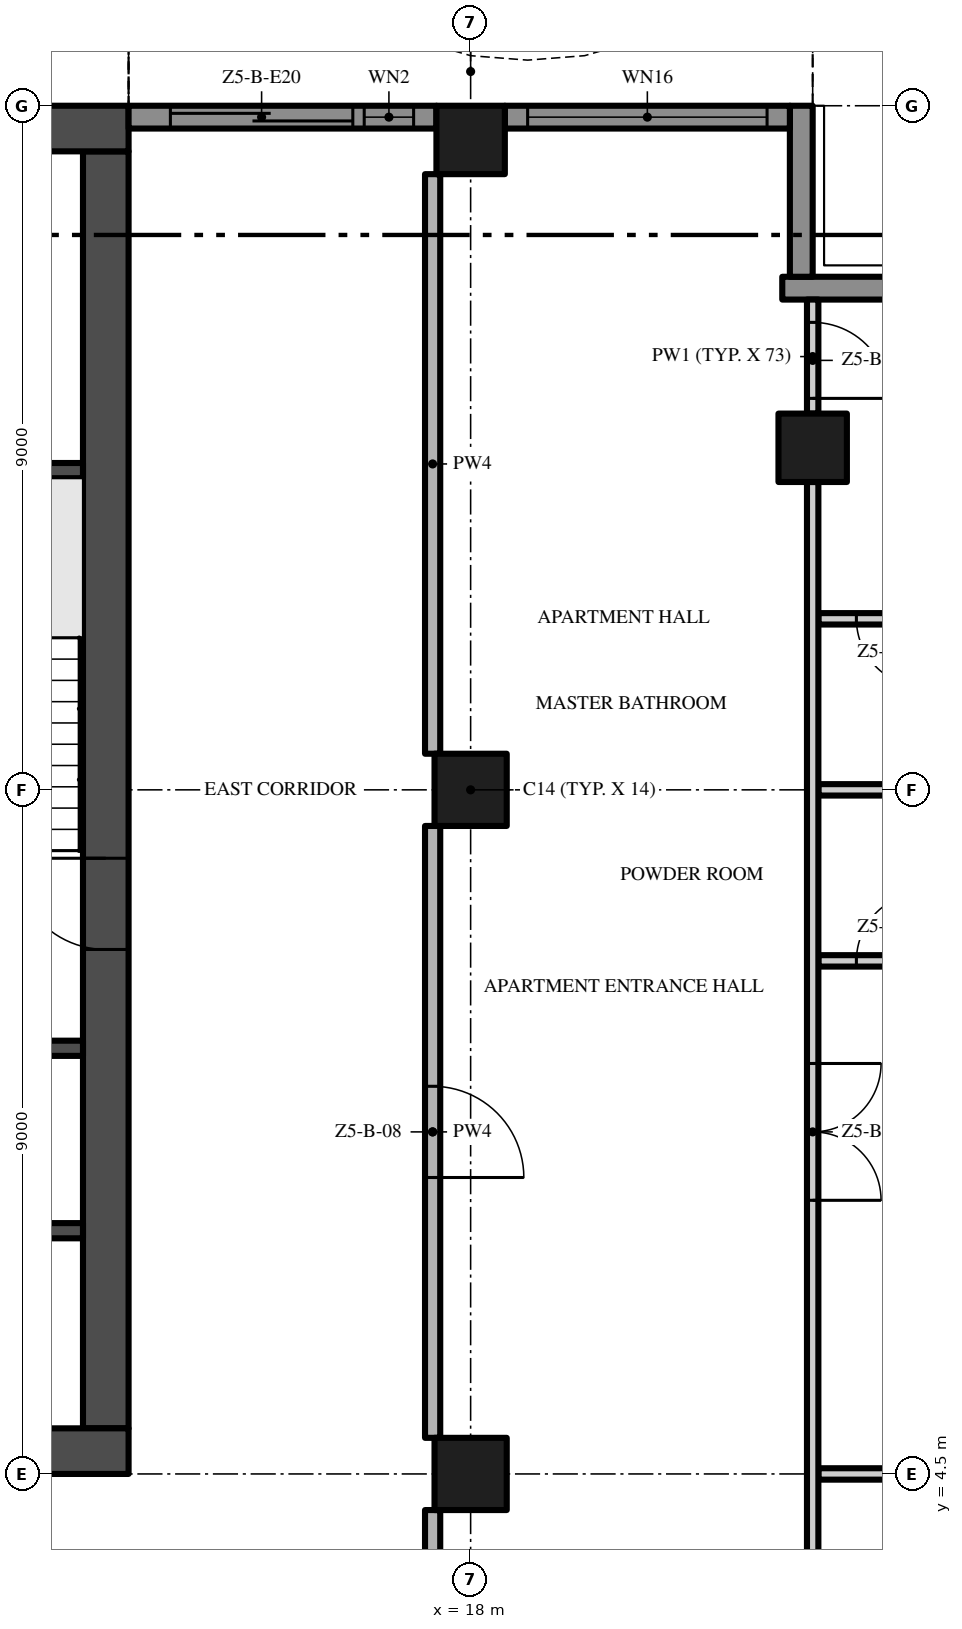
"""IFC4 building model, lengths in metres.
Left out: names, types, materials, properties, quantities, classifications, styles, units other than length and angle.
Written with IfcOpenShell. Run it as: python <this file> out.ifc"""

import sys

from ifc_helpers import new_model, si_unit, direction, frame, frame_2d, origin, origin_2d, place, context, subcontext, project, spatial, polyline, rectangle, outline, extrude, element, fill, save


model = new_model("IFC4")
c1 = context("Model", 3, precision=1e-05, world=origin(), true_north=direction((0.0, 1.0)))
c2 = subcontext(c1, "Body", "Model", "MODEL_VIEW")
j1 = project(units=[si_unit("LENGTHUNIT", "METRE"), si_unit("PLANEANGLEUNIT", "RADIAN")], contexts=[c1])
p1 = place(None, origin())
s1 = spatial("IfcSite", under=j1, at=p1, CompositionType="ELEMENT")
p2 = place(p1, origin())
s2 = spatial("IfcBuilding", under=s1, at=p2, CompositionType="ELEMENT")
p3 = place(p2, frame((0.0, 0.0, 257.8)))
s3 = spatial("IfcBuildingStorey", under=s2, at=p3, CompositionType="ELEMENT", Elevation=257.8)
p4 = place(p3, frame((-13.5, 4.8, -0.3), z_axis=(0.0, 0.0, 1.0), x_axis=(1.0, 0.0, 0.0)))
e1 = element("IfcWall", 1, at=p4, inside=s3, PredefinedType="SHEAR", context=c2, shape_type="SweptSolid", body=[
    extrude(rectangle(XDim=27.0, YDim=0.6, at=frame_2d((13.5, 0.0))), origin(), (0.0, 0.0, 1.0), 3.8),
])
p5 = place(p4, frame((12.0, 0.0, 0.3)))
e2 = element("IfcOpeningElement", 2, at=p5, cuts=e1, PredefinedType="OPENING", context=c2, shape_type="SweptSolid", body=[
    extrude(rectangle(XDim=3.0, YDim=2.4, at=frame_2d((1.5, 1.2))), frame((0.0, 0.31, 0.0), z_axis=(0.0, -1.0, 0.0), x_axis=(1.0, 0.0, 0.0)), (0.0, 0.0, 1.0), 0.62),
])
p6 = place(p4, frame((4.9, 0.0, 0.3)))
e3 = element("IfcOpeningElement", 3, at=p6, cuts=e1, PredefinedType="OPENING", context=c2, shape_type="SweptSolid", body=[
    extrude(rectangle(XDim=1.2, YDim=2.2, at=frame_2d((0.6, 1.1))), frame((0.0, 0.31, 0.0), z_axis=(0.0, -1.0, 0.0), x_axis=(1.0, 0.0, 0.0)), (0.0, 0.0, 1.0), 0.62),
])
p7 = place(p4, frame((20.75, 0.0, 0.3)))
e4 = element("IfcOpeningElement", 4, at=p7, cuts=e1, PredefinedType="OPENING", context=c2, shape_type="SweptSolid", body=[
    extrude(rectangle(XDim=1.5, YDim=2.2, at=frame_2d((0.75, 1.1))), frame((0.0, 0.31, 0.0), z_axis=(0.0, -1.0, 0.0), x_axis=(1.0, 0.0, 0.0)), (0.0, 0.0, 1.0), 0.62),
])
p8 = place(p4, frame((17.4, 0.0, 0.3)))
e5 = element("IfcOpeningElement", 5, at=p8, cuts=e1, PredefinedType="OPENING", context=c2, shape_type="SweptSolid", body=[
    extrude(rectangle(XDim=1.2, YDim=2.2, at=frame_2d((0.6, 1.1))), frame((0.0, 0.31, 0.0), z_axis=(0.0, -1.0, 0.0), x_axis=(1.0, 0.0, 0.0)), (0.0, 0.0, 1.0), 0.62),
])
p9 = place(p3, frame((13.2, 5.1, -0.3), z_axis=(0.0, 0.0, 1.0), x_axis=(0.0, 1.0, 0.0)))
e6 = element("IfcWall", 6, at=p9, inside=s3, PredefinedType="SHEAR", context=c2, shape_type="SweptSolid", body=[
    extrude(rectangle(XDim=16.8, YDim=0.6, at=frame_2d((8.4, 0.0))), origin(), (0.0, 0.0, 1.0), 3.8),
])
p10 = place(p9, frame((6.3, 0.0, 0.3)))
e7 = element("IfcOpeningElement", 7, at=p10, cuts=e6, PredefinedType="OPENING", context=c2, shape_type="SweptSolid", body=[
    extrude(rectangle(XDim=1.2, YDim=2.2, at=frame_2d((0.6, 1.1))), frame((0.0, 0.31, 0.0), z_axis=(0.0, -1.0, 0.0), x_axis=(1.0, 0.0, 0.0)), (0.0, 0.0, 1.0), 0.62),
])
p11 = place(p3, frame((13.5, 22.2, -0.3), z_axis=(0.0, 0.0, 1.0), x_axis=(-1.0, 0.0, 0.0)))
e8 = element("IfcWall", 8, at=p11, inside=s3, PredefinedType="SHEAR", context=c2, shape_type="SweptSolid", body=[
    extrude(rectangle(XDim=27.0, YDim=0.6, at=frame_2d((13.5, 0.0))), origin(), (0.0, 0.0, 1.0), 3.8),
])
p12 = place(p3, frame((18.0, 13.5, 0.0), z_axis=(0.0, 0.0, 1.0), x_axis=(1.0, 0.0, 0.0)))
e9 = element("IfcColumn", 9, at=p12, inside=s3, PredefinedType="COLUMN", context=c2, shape_type="SweptSolid", body=[
    extrude(rectangle(XDim=0.95, YDim=0.95, at=origin_2d()), origin(), (0.0, 0.0, 1.0), 3.5),
])
p13 = place(p3, frame((18.0, 22.05, 0.0), z_axis=(0.0, 0.0, 1.0), x_axis=(1.0, 0.0, 0.0)))
e10 = element("IfcColumn", 10, at=p13, inside=s3, PredefinedType="COLUMN", context=c2, shape_type="SweptSolid", body=[
    extrude(rectangle(XDim=0.9, YDim=0.9, at=origin_2d()), origin(), (0.0, 0.0, 1.0), 3.5),
])
p14 = place(p3, frame((18.0, 4.5, 0.0), z_axis=(0.0, 0.0, 1.0), x_axis=(1.0, 0.0, 0.0)))
e11 = element("IfcColumn", 11, at=p14, inside=s3, PredefinedType="COLUMN", context=c2, shape_type="SweptSolid", body=[
    extrude(rectangle(XDim=0.95, YDim=0.95, at=origin_2d()), origin(), (0.0, 0.0, 1.0), 3.5),
])
p15 = place(p3, frame((22.5, 18.0, 0.0), z_axis=(0.0, 0.0, 1.0), x_axis=(1.0, 0.0, 0.0)))
e12 = element("IfcColumn", 12, at=p15, inside=s3, PredefinedType="COLUMN", context=c2, shape_type="SweptSolid", body=[
    extrude(rectangle(XDim=0.9, YDim=0.9, at=origin_2d()), origin(), (0.0, 0.0, 1.0), 3.5),
])
p16 = place(p3, frame((22.1, 20.1, 0.0), z_axis=(0.0, 0.0, 1.0), x_axis=(1.0, 0.0, 0.0)))
e13 = element("IfcWall", 13, at=p16, inside=s3, PredefinedType="SOLIDWALL", context=c2, shape_type="SweptSolid", body=[
    extrude(rectangle(XDim=2.35, YDim=0.3, at=frame_2d((1.175, 0.0))), origin(), (0.0, 0.0, 1.0), 3.5),
])
p17 = place(p3, frame((22.35, 22.5, 0.0), z_axis=(0.0, 0.0, 1.0), x_axis=(0.0, -1.0, 0.0)))
e14 = element("IfcWall", 14, at=p17, inside=s3, PredefinedType="SOLIDWALL", context=c2, shape_type="SweptSolid", body=[
    extrude(rectangle(XDim=2.25, YDim=0.3, at=frame_2d((1.125, 0.0))), origin(), (0.0, 0.0, 1.0), 3.5),
])
p18 = place(p3, frame((18.45, 22.35, 0.0), z_axis=(0.0, 0.0, 1.0), x_axis=(1.0, 0.0, 0.0)))
e15 = element("IfcWall", 15, at=p18, inside=s3, PredefinedType="SOLIDWALL", context=c2, shape_type="SweptSolid", body=[
    extrude(rectangle(XDim=3.75, YDim=0.3, at=frame_2d((1.875, 0.0))), origin(), (0.0, 0.0, 1.0), 3.5),
])
p19 = place(p18, frame((0.3, 0.0, 0.45)))
e16 = element("IfcOpeningElement", 16, at=p19, cuts=e15, PredefinedType="OPENING", context=c2, shape_type="SweptSolid", body=[
    extrude(rectangle(XDim=3.15, YDim=2.65, at=frame_2d((1.575, 1.325))), frame((0.0, 0.16, 0.0), z_axis=(0.0, -1.0, 0.0), x_axis=(1.0, 0.0, 0.0)), (0.0, 0.0, 1.0), 0.32),
])
p20 = place(p3, frame((13.5, 22.35, 0.0), z_axis=(0.0, 0.0, 1.0), x_axis=(1.0, 0.0, 0.0)))
e17 = element("IfcWall", 17, at=p20, inside=s3, PredefinedType="SOLIDWALL", context=c2, shape_type="SweptSolid", body=[
    extrude(rectangle(XDim=4.05, YDim=0.3, at=frame_2d((2.025, 0.0))), origin(), (0.0, 0.0, 1.0), 3.5),
])
p21 = place(p20, frame((3.1, 0.0, 0.45)))
e18 = element("IfcOpeningElement", 18, at=p21, cuts=e17, PredefinedType="OPENING", context=c2, shape_type="SweptSolid", body=[
    extrude(rectangle(XDim=0.65, YDim=2.65, at=frame_2d((0.325, 1.325))), frame((0.0, 0.16, 0.0), z_axis=(0.0, -1.0, 0.0), x_axis=(1.0, 0.0, 0.0)), (0.0, 0.0, 1.0), 0.32),
])
p22 = place(p20, frame((0.55, 0.0, 0.0)))
e19 = element("IfcOpeningElement", 19, at=p22, cuts=e17, PredefinedType="OPENING", context=c2, shape_type="SweptSolid", body=[
    extrude(rectangle(XDim=2.4, YDim=2.4, at=frame_2d((1.2, 1.2))), frame((0.0, 0.16, 0.0), z_axis=(0.0, -1.0, 0.0), x_axis=(1.0, 0.0, 0.0)), (0.0, 0.0, 1.0), 0.32),
])
p23 = place(p3, origin())
e20 = element("IfcWall", 20, at=p23, inside=s3, PredefinedType="USERDEFINED", context=c2, shape_type="SweptSolid", body=[
    extrude(outline(polyline([(22.5, 24.3), (21.0, 23.595), (19.5, 23.159), (18.75, 23.1), (18.0, 23.159), (16.5, 23.595), (15.0, 24.3), (13.5, 25.005), (13.394, 24.779), (14.894, 24.074), (16.411, 23.36), (17.955, 22.911), (18.75, 22.849), (19.545, 22.911), (21.089, 23.36), (22.606, 24.074), (22.5, 24.3)])), origin(), (0.0, 0.0, 1.0), 0.9),
])
for number, where, z_axis, x_axis in (
    (21, (9.65, 7.7, 0.0), (0.0, 0.0, 1.0), (1.0, 0.0, 0.0)),
    (22, (9.65, 10.1, 0.0), (0.0, 0.0, 1.0), (1.0, 0.0, 0.0)),
    (23, (9.65, 17.7, 0.0), (0.0, 0.0, 1.0), (1.0, 0.0, 0.0)),
):
    element("IfcWall", number, at=place(p3, frame(where, z_axis=z_axis, x_axis=x_axis)), inside=s3, PredefinedType="SHEAR", context=c2, shape_type="SweptSolid", body=[
        extrude(rectangle(XDim=3.25, YDim=0.2, at=frame_2d((1.625, 0.0))), origin(), (0.0, 0.0, 1.0), 3.5),
    ])
p24 = place(p3, frame((22.575, 4.5, 0.0), z_axis=(0.0, 0.0, 1.0), x_axis=(1.0, 0.0, 0.0)))
e24 = element("IfcWall", 24, at=p24, inside=s3, PredefinedType="PARTITIONING", context=c2, shape_type="SweptSolid", body=[
    extrude(rectangle(XDim=3.525, YDim=0.15, at=frame_2d((1.762, 0.0))), origin(), (0.0, 0.0, 1.0), 3.5),
])
p25 = place(p3, frame((22.575, 11.25, 0.0), z_axis=(0.0, 0.0, 1.0), x_axis=(1.0, 0.0, 0.0)))
e25 = element("IfcWall", 25, at=p25, inside=s3, PredefinedType="PARTITIONING", context=c2, shape_type="SweptSolid", body=[
    extrude(rectangle(XDim=1.875, YDim=0.15, at=frame_2d((0.938, 0.0))), origin(), (0.0, 0.0, 1.0), 3.5),
])
p26 = place(p25, frame((0.5, 0.0, 0.0)))
e26 = element("IfcOpeningElement", 26, at=p26, cuts=e25, PredefinedType="OPENING", context=c2, shape_type="SweptSolid", body=[
    extrude(rectangle(XDim=0.9, YDim=2.1, at=frame_2d((0.45, 1.05))), frame((0.0, 0.085, 0.0), z_axis=(0.0, -1.0, 0.0), x_axis=(1.0, 0.0, 0.0)), (0.0, 0.0, 1.0), 0.17),
])
p27 = place(p3, frame((22.575, 13.5, 0.0), z_axis=(0.0, 0.0, 1.0), x_axis=(1.0, 0.0, 0.0)))
e27 = element("IfcWall", 27, at=p27, inside=s3, PredefinedType="PARTITIONING", context=c2, shape_type="SweptSolid", body=[
    extrude(rectangle(XDim=1.875, YDim=0.15, at=frame_2d((0.938, 0.0))), origin(), (0.0, 0.0, 1.0), 3.5),
])
p28 = place(p3, frame((24.45, 15.75, 0.0), z_axis=(0.0, 0.0, 1.0), x_axis=(-1.0, 0.0, 0.0)))
e28 = element("IfcWall", 28, at=p28, inside=s3, PredefinedType="PARTITIONING", context=c2, shape_type="SweptSolid", body=[
    extrude(rectangle(XDim=1.875, YDim=0.15, at=frame_2d((0.938, 0.0))), origin(), (0.0, 0.0, 1.0), 3.5),
])
p29 = place(p28, frame((0.475, 0.0, 0.0)))
e29 = element("IfcOpeningElement", 29, at=p29, cuts=e28, PredefinedType="OPENING", context=c2, shape_type="SweptSolid", body=[
    extrude(rectangle(XDim=0.9, YDim=2.1, at=frame_2d((0.45, 1.05))), frame((0.0, 0.085, 0.0), z_axis=(0.0, -1.0, 0.0), x_axis=(1.0, 0.0, 0.0)), (0.0, 0.0, 1.0), 0.17),
])
p30 = place(p3, frame((17.5, -0.2, 0.0), z_axis=(0.0, 0.0, 1.0), x_axis=(0.0, 1.0, 0.0)))
e30 = element("IfcWall", 30, at=p30, inside=s3, PredefinedType="PARTITIONING", context=c2, shape_type="SweptSolid", body=[
    extrude(rectangle(XDim=4.225, YDim=0.2, at=frame_2d((2.112, 0.0))), origin(), (0.0, 0.0, 1.0), 3.5),
])
p31 = place(p3, frame((17.5, 13.025, 0.0), z_axis=(0.0, 0.0, 1.0), x_axis=(0.0, -1.0, 0.0)))
e31 = element("IfcWall", 31, at=p31, inside=s3, PredefinedType="PARTITIONING", context=c2, shape_type="SweptSolid", body=[
    extrude(rectangle(XDim=8.05, YDim=0.2, at=frame_2d((4.025, 0.0))), origin(), (0.0, 0.0, 1.0), 3.5),
])
p32 = place(p31, frame((3.425, 0.0, 0.0)))
e32 = element("IfcOpeningElement", 32, at=p32, cuts=e31, PredefinedType="OPENING", context=c2, shape_type="SweptSolid", body=[
    extrude(rectangle(XDim=1.2, YDim=2.4, at=frame_2d((0.6, 1.2))), frame((0.0, 0.11, 0.0), z_axis=(0.0, -1.0, 0.0), x_axis=(1.0, 0.0, 0.0)), (0.0, 0.0, 1.0), 0.22),
])
p33 = place(p3, frame((17.5, 13.975, 0.0), z_axis=(0.0, 0.0, 1.0), x_axis=(0.0, 1.0, 0.0)))
e33 = element("IfcWall", 33, at=p33, inside=s3, PredefinedType="PARTITIONING", context=c2, shape_type="SweptSolid", body=[
    extrude(rectangle(XDim=7.625, YDim=0.2, at=frame_2d((3.812, 0.0))), origin(), (0.0, 0.0, 1.0), 3.5),
])
p34 = place(p3, frame((22.5, 17.55, 0.0), z_axis=(0.0, 0.0, 1.0), x_axis=(0.0, -1.0, 0.0)))
e34 = element("IfcWall", 34, at=p34, inside=s3, PredefinedType="PARTITIONING", context=c2, shape_type="SweptSolid", body=[
    extrude(rectangle(XDim=17.45, YDim=0.15, at=frame_2d((8.725, 0.0))), origin(), (0.0, 0.0, 1.0), 3.5),
])
p35 = place(p34, frame((14.8, 0.0, 0.0)))
e35 = element("IfcOpeningElement", 35, at=p35, cuts=e34, PredefinedType="OPENING", context=c2, shape_type="SweptSolid", body=[
    extrude(rectangle(XDim=1.0, YDim=2.4, at=frame_2d((0.5, 1.2))), frame((0.0, 0.085, 0.0), z_axis=(0.0, -1.0, 0.0), x_axis=(1.0, 0.0, 0.0)), (0.0, 0.0, 1.0), 0.17),
])
p36 = place(p34, frame((7.65, 0.0, 0.0)))
e36 = element("IfcOpeningElement", 36, at=p36, cuts=e34, PredefinedType="OPENING", context=c2, shape_type="SweptSolid", body=[
    extrude(rectangle(XDim=1.8, YDim=2.4, at=frame_2d((0.9, 1.2))), frame((0.0, 0.085, 0.0), z_axis=(0.0, -1.0, 0.0), x_axis=(1.0, 0.0, 0.0)), (0.0, 0.0, 1.0), 0.17),
])
p37 = place(p3, frame((22.5, 19.95, 0.0), z_axis=(0.0, 0.0, 1.0), x_axis=(0.0, -1.0, 0.0)))
e37 = element("IfcWall", 37, at=p37, inside=s3, PredefinedType="PARTITIONING", context=c2, shape_type="SweptSolid", body=[
    extrude(rectangle(XDim=1.5, YDim=0.15, at=frame_2d((0.75, 0.0))), origin(), (0.0, 0.0, 1.0), 3.5),
])
p38 = place(p37, frame((0.3, 0.0, 0.0)))
e38 = element("IfcOpeningElement", 38, at=p38, cuts=e37, PredefinedType="OPENING", context=c2, shape_type="SweptSolid", body=[
    extrude(rectangle(XDim=1.0, YDim=2.4, at=frame_2d((0.5, 1.2))), frame((0.0, 0.085, 0.0), z_axis=(0.0, -1.0, 0.0), x_axis=(1.0, 0.0, 0.0)), (0.0, 0.0, 1.0), 0.17),
])
p39 = place(p19, origin())
e39 = element("IfcWindow", 39, at=p39, inside=s3, PartitioningType="SINGLE_PANEL", PredefinedType="WINDOW", context=c2, shape_type="SweptSolid", body=[
    extrude(rectangle(XDim=3.15, YDim=2.65, at=frame_2d((1.575, 1.325))), frame((0.0, 0.03, 0.0), z_axis=(0.0, -1.0, 0.0), x_axis=(1.0, 0.0, 0.0)), (0.0, 0.0, 1.0), 0.06),
])
fill(e16, e39)
p40 = place(p21, origin())
e40 = element("IfcWindow", 40, at=p40, inside=s3, PartitioningType="SINGLE_PANEL", PredefinedType="WINDOW", context=c2, shape_type="SweptSolid", body=[
    extrude(rectangle(XDim=0.65, YDim=2.65, at=frame_2d((0.325, 1.325))), frame((0.0, 0.03, 0.0), z_axis=(0.0, -1.0, 0.0), x_axis=(1.0, 0.0, 0.0)), (0.0, 0.0, 1.0), 0.06),
])
fill(e18, e40)
p41 = place(p22, origin())
e41 = element("IfcDoor", 41, at=p41, inside=s3, OperationType="SINGLE_SWING_LEFT", PredefinedType="DOOR", context=c2, shape_type="SweptSolid", body=[
    extrude(rectangle(XDim=2.4, YDim=2.4, at=frame_2d((1.2, 1.2))), frame((0.0, 0.025, 0.0), z_axis=(0.0, -1.0, 0.0), x_axis=(1.0, 0.0, 0.0)), (0.0, 0.0, 1.0), 0.05),
])
fill(e19, e41)
p42 = place(p10, frame((1.2, 0.0, 0.0), z_axis=(0.0, 0.0, 1.0), x_axis=(-1.0, 0.0, 0.0)))
e42 = element("IfcDoor", 42, at=p42, inside=s3, OperationType="SINGLE_SWING_LEFT", PredefinedType="DOOR", context=c2, shape_type="SweptSolid", body=[
    extrude(rectangle(XDim=1.2, YDim=2.2, at=frame_2d((0.6, 1.1))), frame((0.0, 0.025, 0.0), z_axis=(0.0, -1.0, 0.0), x_axis=(1.0, 0.0, 0.0)), (0.0, 0.0, 1.0), 0.05),
])
fill(e7, e42)
p43 = place(p32, origin())
e43 = element("IfcDoor", 43, at=p43, inside=s3, OperationType="SINGLE_SWING_RIGHT", PredefinedType="DOOR", context=c2, shape_type="SweptSolid", body=[
    extrude(rectangle(XDim=1.2, YDim=2.4, at=frame_2d((0.6, 1.2))), frame((0.0, 0.025, 0.0), z_axis=(0.0, -1.0, 0.0), x_axis=(1.0, 0.0, 0.0)), (0.0, 0.0, 1.0), 0.05),
])
fill(e32, e43)
p44 = place(p36, origin())
e44 = element("IfcDoor", 44, at=p44, inside=s3, OperationType="DOUBLE_DOOR_SINGLE_SWING", PredefinedType="DOOR", context=c2, shape_type="SweptSolid", body=[
    extrude(rectangle(XDim=1.8, YDim=2.4, at=frame_2d((0.9, 1.2))), frame((0.0, 0.025, 0.0), z_axis=(0.0, -1.0, 0.0), x_axis=(1.0, 0.0, 0.0)), (0.0, 0.0, 1.0), 0.05),
])
fill(e36, e44)
p45 = place(p26, origin())
e45 = element("IfcDoor", 45, at=p45, inside=s3, OperationType="SINGLE_SWING_RIGHT", PredefinedType="DOOR", context=c2, shape_type="SweptSolid", body=[
    extrude(rectangle(XDim=0.9, YDim=2.1, at=frame_2d((0.45, 1.05))), frame((0.0, 0.025, 0.0), z_axis=(0.0, -1.0, 0.0), x_axis=(1.0, 0.0, 0.0)), (0.0, 0.0, 1.0), 0.05),
])
fill(e26, e45)
p46 = place(p38, origin())
e46 = element("IfcDoor", 46, at=p46, inside=s3, OperationType="SINGLE_SWING_RIGHT", PredefinedType="DOOR", context=c2, shape_type="SweptSolid", body=[
    extrude(rectangle(XDim=1.0, YDim=2.4, at=frame_2d((0.5, 1.2))), frame((0.0, 0.025, 0.0), z_axis=(0.0, -1.0, 0.0), x_axis=(1.0, 0.0, 0.0)), (0.0, 0.0, 1.0), 0.05),
])
fill(e38, e46)
p47 = place(p29, origin())
e47 = element("IfcDoor", 47, at=p47, inside=s3, OperationType="SINGLE_SWING_LEFT", PredefinedType="DOOR", context=c2, shape_type="SweptSolid", body=[
    extrude(rectangle(XDim=0.9, YDim=2.1, at=frame_2d((0.45, 1.05))), frame((0.0, 0.025, 0.0), z_axis=(0.0, -1.0, 0.0), x_axis=(1.0, 0.0, 0.0)), (0.0, 0.0, 1.0), 0.05),
])
fill(e29, e47)
save(model, sys.argv[1])
